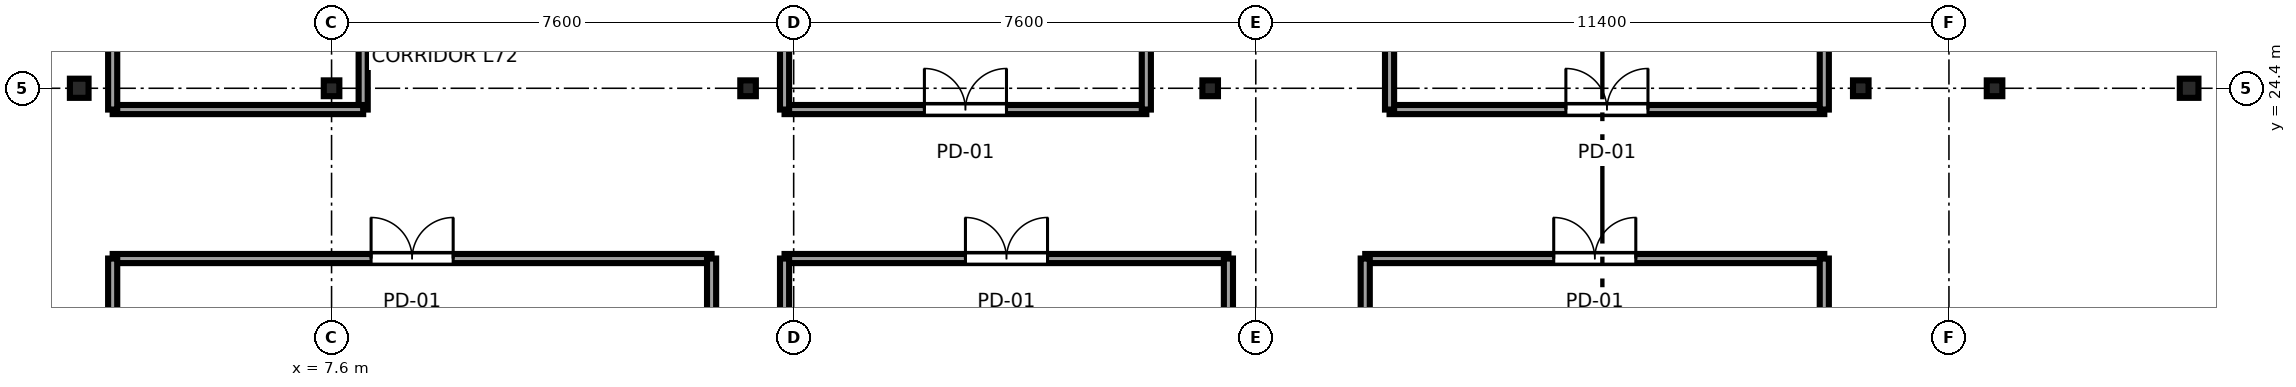
"""IFC4 building model, lengths in metres.
Left out: names, types, materials, properties, quantities, classifications, styles, units other than length and angle.
Written with IfcOpenShell. Run it as: python <this file> out.ifc"""

import sys

from ifc_helpers import new_model, si_unit, direction, frame, frame_2d, origin, origin_2d, place, context, subcontext, project, spatial, rectangle, i_section, extrude, source, transform, mapped, element, fill, save


model = new_model("IFC4")
c1 = context("Model", 3, precision=1e-05, world=origin(), true_north=direction((0.0, 1.0)))
c2 = subcontext(c1, "Body", "Model", "MODEL_VIEW")
j1 = project(units=[si_unit("LENGTHUNIT", "METRE"), si_unit("PLANEANGLEUNIT", "RADIAN")], contexts=[c1])
p1 = place(None, origin())
s1 = spatial("IfcSite", under=j1, at=p1, CompositionType="ELEMENT")
p2 = place(p1, origin())
s2 = spatial("IfcBuilding", under=s1, at=p2, CompositionType="ELEMENT")
p3 = place(p2, frame((0.0, 0.0, 270.05)))
s3 = spatial("IfcBuildingStorey", under=s2, at=p3, CompositionType="ELEMENT", Elevation=270.05)
m1 = source(origin(), c2, "Body", "SweptSolid", [
    extrude(i_section(OverallWidth=0.307, OverallDepth=0.315, WebThickness=0.012, FlangeThickness=0.019, FilletRadius=0.017, at=origin_2d()), origin(), (0.0, 0.0, 1.0), 5.0),
])
p4 = place(p3, frame((3.45, 24.4, 0.0), z_axis=(0.0, 0.0, 1.0), x_axis=(1.0, 0.0, 0.0)))
e1 = element("IfcColumn", 1, at=p4, inside=s3, PredefinedType="COLUMN", context=c2, shape_type="MappedRepresentation", body=[
    mapped(m1, transform((0.0, 0.0, 0.0), x_axis=(1.0, 0.0, 0.0), y_axis=(0.0, 1.0, 0.0), z_axis=(0.0, 0.0, 1.0), scale=1.0)),
])
m2 = source(origin(), c2, "Body", "SweptSolid", [
    extrude(i_section(OverallWidth=0.256, OverallDepth=0.26, WebThickness=0.01, FlangeThickness=0.017, FilletRadius=0.014, at=origin_2d()), origin(), (0.0, 0.0, 1.0), 5.0),
])
for number, where, z_axis, x_axis in (
    (2, (7.6, 24.4, 0.0), (0.0, 0.0, 1.0), (1.0, 0.0, 0.0)),
    (3, (14.45, 24.4, 0.0), (0.0, 0.0, 1.0), (1.0, 0.0, 0.0)),
    (4, (22.05, 24.4, 0.0), (0.0, 0.0, 1.0), (1.0, 0.0, 0.0)),
    (5, (32.75, 24.4, 0.0), (0.0, 0.0, 1.0), (1.0, 0.0, 0.0)),
    (6, (34.95, 24.4, 0.0), (0.0, 0.0, 1.0), (1.0, 0.0, 0.0)),
):
    element("IfcColumn", number, at=place(p3, frame(where, z_axis=z_axis, x_axis=x_axis)), inside=s3, PredefinedType="COLUMN", context=c2, shape_type="MappedRepresentation", body=[
        mapped(m2, transform((0.0, 0.0, 0.0), x_axis=(1.0, 0.0, 0.0), y_axis=(0.0, 1.0, 0.0), z_axis=(0.0, 0.0, 1.0), scale=1.0)),
    ])
p5 = place(p3, frame((38.15, 24.4, 0.0), z_axis=(0.0, 0.0, 1.0), x_axis=(1.0, 0.0, 0.0)))
e7 = element("IfcColumn", 7, at=p5, inside=s3, PredefinedType="COLUMN", context=c2, shape_type="MappedRepresentation", body=[
    mapped(m1, transform((0.0, 0.0, 0.0), x_axis=(1.0, 0.0, 0.0), y_axis=(0.0, 1.0, 0.0), z_axis=(0.0, 0.0, 1.0), scale=1.0)),
])
p6 = place(p3, frame((8.12, 24.05, 0.0), z_axis=(0.0, 0.0, 1.0), x_axis=(0.0, 1.0, 0.0)))
e8 = element("IfcWall", 8, at=p6, inside=s3, PredefinedType="PARTITIONING", context=c2, shape_type="SweptSolid", body=[
    extrude(rectangle(XDim=11.55, YDim=0.15, at=frame_2d((5.775, 0.0))), origin(), (0.0, 0.0, 1.0), 4.78),
])
p7 = place(p6, frame((4.125, 0.0, 0.0)))
e9 = element("IfcOpeningElement", 9, at=p7, cuts=e8, PredefinedType="OPENING", context=c2, shape_type="SweptSolid", body=[
    extrude(rectangle(XDim=1.35, YDim=2.15, at=frame_2d((0.675, 1.075))), frame((0.0, 0.085, 0.0), z_axis=(0.0, -1.0, 0.0), x_axis=(1.0, 0.0, 0.0)), (0.0, 0.0, 1.0), 0.17),
])
p8 = place(p3, frame((4.0, 24.05, 0.0), z_axis=(0.0, 0.0, 1.0), x_axis=(1.0, 0.0, 0.0)))
e10 = element("IfcWall", 10, at=p8, inside=s3, PredefinedType="PARTITIONING", context=c2, shape_type="SweptSolid", body=[
    extrude(rectangle(XDim=4.12, YDim=0.15, at=frame_2d((2.06, 0.0))), origin(), (0.0, 0.0, 1.0), 4.78),
])
p9 = place(p3, frame((4.0, 24.05, 0.0), z_axis=(0.0, 0.0, 1.0), x_axis=(0.0, 1.0, 0.0)))
e11 = element("IfcWall", 11, at=p9, inside=s3, PredefinedType="PARTITIONING", context=c2, shape_type="SweptSolid", body=[
    extrude(rectangle(XDim=11.55, YDim=0.15, at=frame_2d((5.775, 0.0))), origin(), (0.0, 0.0, 1.0), 4.31),
])
p10 = place(p3, frame((15.05, 24.05, 0.0), z_axis=(0.0, 0.0, 1.0), x_axis=(1.0, 0.0, 0.0)))
e12 = element("IfcWall", 12, at=p10, inside=s3, PredefinedType="PARTITIONING", context=c2, shape_type="SweptSolid", body=[
    extrude(rectangle(XDim=5.95, YDim=0.15, at=frame_2d((2.975, 0.0))), origin(), (0.0, 0.0, 1.0), 4.78),
])
p11 = place(p10, frame((2.3, 0.0, 0.0)))
e13 = element("IfcOpeningElement", 13, at=p11, cuts=e12, PredefinedType="OPENING", context=c2, shape_type="SweptSolid", body=[
    extrude(rectangle(XDim=1.35, YDim=2.15, at=frame_2d((0.675, 1.075))), frame((0.0, 0.085, 0.0), z_axis=(0.0, -1.0, 0.0), x_axis=(1.0, 0.0, 0.0)), (0.0, 0.0, 1.0), 0.17),
])
for number, where, z_axis, x_axis in (
    (14, (15.05, 24.05, 0.0), (0.0, 0.0, 1.0), (0.0, 1.0, 0.0)),
    (15, (21.0, 24.05, 0.0), (0.0, 0.0, 1.0), (0.0, 1.0, 0.0)),
):
    element("IfcWall", number, at=place(p3, frame(where, z_axis=z_axis, x_axis=x_axis)), inside=s3, PredefinedType="PARTITIONING", context=c2, shape_type="SweptSolid", body=[
        extrude(rectangle(XDim=5.4, YDim=0.15, at=frame_2d((2.7, 0.0))), origin(), (0.0, 0.0, 1.0), 4.78),
    ])
p12 = place(p3, frame((25.0, 24.05, 0.0), z_axis=(0.0, 0.0, 1.0), x_axis=(1.0, 0.0, 0.0)))
e16 = element("IfcWall", 16, at=p12, inside=s3, PredefinedType="PARTITIONING", context=c2, shape_type="SweptSolid", body=[
    extrude(rectangle(XDim=7.15, YDim=0.15, at=frame_2d((3.575, 0.0))), origin(), (0.0, 0.0, 1.0), 4.78),
])
p13 = place(p12, frame((2.9, 0.0, 0.0)))
e17 = element("IfcOpeningElement", 17, at=p13, cuts=e16, PredefinedType="OPENING", context=c2, shape_type="SweptSolid", body=[
    extrude(rectangle(XDim=1.35, YDim=2.15, at=frame_2d((0.675, 1.075))), frame((0.0, 0.085, 0.0), z_axis=(0.0, -1.0, 0.0), x_axis=(1.0, 0.0, 0.0)), (0.0, 0.0, 1.0), 0.17),
])
for number, where, z_axis, x_axis in (
    (18, (25.0, 24.05, 0.0), (0.0, 0.0, 1.0), (0.0, 1.0, 0.0)),
    (19, (32.15, 24.05, 0.0), (0.0, 0.0, 1.0), (0.0, 1.0, 0.0)),
):
    element("IfcWall", number, at=place(p3, frame(where, z_axis=z_axis, x_axis=x_axis)), inside=s3, PredefinedType="PARTITIONING", context=c2, shape_type="SweptSolid", body=[
        extrude(rectangle(XDim=5.4, YDim=0.15, at=frame_2d((2.7, 0.0))), origin(), (0.0, 0.0, 1.0), 4.78),
    ])
p14 = place(p3, frame((4.0, 21.6, 0.0), z_axis=(0.0, 0.0, 1.0), x_axis=(1.0, 0.0, 0.0)))
e20 = element("IfcWall", 20, at=p14, inside=s3, PredefinedType="PARTITIONING", context=c2, shape_type="SweptSolid", body=[
    extrude(rectangle(XDim=9.85, YDim=0.15, at=frame_2d((4.925, 0.0))), origin(), (0.0, 0.0, 1.0), 4.78),
])
p15 = place(p14, frame((4.25, 0.0, 0.0)))
e21 = element("IfcOpeningElement", 21, at=p15, cuts=e20, PredefinedType="OPENING", context=c2, shape_type="SweptSolid", body=[
    extrude(rectangle(XDim=1.35, YDim=2.15, at=frame_2d((0.675, 1.075))), frame((0.0, 0.085, 0.0), z_axis=(0.0, -1.0, 0.0), x_axis=(1.0, 0.0, 0.0)), (0.0, 0.0, 1.0), 0.17),
])
p16 = place(p3, frame((4.0, 7.984, 0.0), z_axis=(0.0, 0.0, 1.0), x_axis=(0.0, 1.0, 0.0)))
e22 = element("IfcWall", 22, at=p16, inside=s3, PredefinedType="PARTITIONING", context=c2, shape_type="SweptSolid", body=[
    extrude(rectangle(XDim=13.616, YDim=0.15, at=frame_2d((6.808, 0.0))), origin(), (0.0, 0.0, 1.0), 3.57),
])
p17 = place(p3, frame((13.85, 6.65, 0.0), z_axis=(0.0, 0.0, 1.0), x_axis=(0.0, 1.0, 0.0)))
e23 = element("IfcWall", 23, at=p17, inside=s3, PredefinedType="PARTITIONING", context=c2, shape_type="SweptSolid", body=[
    extrude(rectangle(XDim=14.95, YDim=0.15, at=frame_2d((7.475, 0.0))), origin(), (0.0, 0.0, 1.0), 4.78),
])
p18 = place(p3, frame((15.05, 21.6, 0.0), z_axis=(0.0, 0.0, 1.0), x_axis=(1.0, 0.0, 0.0)))
e24 = element("IfcWall", 24, at=p18, inside=s3, PredefinedType="PARTITIONING", context=c2, shape_type="SweptSolid", body=[
    extrude(rectangle(XDim=7.3, YDim=0.15, at=frame_2d((3.65, 0.0))), origin(), (0.0, 0.0, 1.0), 4.78),
])
p19 = place(p18, frame((2.975, 0.0, 0.0)))
e25 = element("IfcOpeningElement", 25, at=p19, cuts=e24, PredefinedType="OPENING", context=c2, shape_type="SweptSolid", body=[
    extrude(rectangle(XDim=1.35, YDim=2.15, at=frame_2d((0.675, 1.075))), frame((0.0, 0.085, 0.0), z_axis=(0.0, -1.0, 0.0), x_axis=(1.0, 0.0, 0.0)), (0.0, 0.0, 1.0), 0.17),
])
p20 = place(p3, frame((15.05, 16.6, 0.0), z_axis=(0.0, 0.0, 1.0), x_axis=(0.0, 1.0, 0.0)))
e26 = element("IfcWall", 26, at=p20, inside=s3, PredefinedType="PARTITIONING", context=c2, shape_type="SweptSolid", body=[
    extrude(rectangle(XDim=5.0, YDim=0.15, at=frame_2d((2.5, 0.0))), origin(), (0.0, 0.0, 1.0), 4.78),
])
p21 = place(p3, frame((22.35, 16.6, 0.0), z_axis=(0.0, 0.0, 1.0), x_axis=(0.0, 1.0, 0.0)))
e27 = element("IfcWall", 27, at=p21, inside=s3, PredefinedType="PARTITIONING", context=c2, shape_type="SweptSolid", body=[
    extrude(rectangle(XDim=5.0, YDim=0.15, at=frame_2d((2.5, 0.0))), origin(), (0.0, 0.0, 1.0), 3.57),
])
p22 = place(p3, frame((24.6, 21.6, 0.0), z_axis=(0.0, 0.0, 1.0), x_axis=(1.0, 0.0, 0.0)))
e28 = element("IfcWall", 28, at=p22, inside=s3, PredefinedType="PARTITIONING", context=c2, shape_type="SweptSolid", body=[
    extrude(rectangle(XDim=7.55, YDim=0.15, at=frame_2d((3.775, 0.0))), origin(), (0.0, 0.0, 1.0), 4.78),
])
p23 = place(p22, frame((3.1, 0.0, 0.0)))
e29 = element("IfcOpeningElement", 29, at=p23, cuts=e28, PredefinedType="OPENING", context=c2, shape_type="SweptSolid", body=[
    extrude(rectangle(XDim=1.35, YDim=2.15, at=frame_2d((0.675, 1.075))), frame((0.0, 0.085, 0.0), z_axis=(0.0, -1.0, 0.0), x_axis=(1.0, 0.0, 0.0)), (0.0, 0.0, 1.0), 0.17),
])
for number, where, z_axis, x_axis in (
    (30, (24.6, 16.6, 0.0), (0.0, 0.0, 1.0), (0.0, 1.0, 0.0)),
    (31, (32.15, 16.6, 0.0), (0.0, 0.0, 1.0), (0.0, 1.0, 0.0)),
):
    element("IfcWall", number, at=place(p3, frame(where, z_axis=z_axis, x_axis=x_axis)), inside=s3, PredefinedType="PARTITIONING", context=c2, shape_type="SweptSolid", body=[
        extrude(rectangle(XDim=5.0, YDim=0.15, at=frame_2d((2.5, 0.0))), origin(), (0.0, 0.0, 1.0), 4.78),
    ])
m3 = source(origin(), c2, "Body", "SweptSolid", [
    extrude(rectangle(XDim=1.35, YDim=2.15, at=frame_2d((0.675, 1.075))), frame((0.0, 0.025, 0.0), z_axis=(0.0, -1.0, 0.0), x_axis=(1.0, 0.0, 0.0)), (0.0, 0.0, 1.0), 0.05),
])
p24 = place(p11, origin())
e32 = element("IfcDoor", 32, at=p24, inside=s3, OperationType="DOUBLE_DOOR_SINGLE_SWING", PredefinedType="DOOR", context=c2, shape_type="MappedRepresentation", body=[
    mapped(m3, transform((0.0, 0.0, 0.0), x_axis=(1.0, 0.0, 0.0), y_axis=(0.0, 1.0, 0.0), z_axis=(0.0, 0.0, 1.0), scale=1.0)),
])
fill(e13, e32)
p25 = place(p13, origin())
e33 = element("IfcDoor", 33, at=p25, inside=s3, OperationType="DOUBLE_DOOR_SINGLE_SWING", PredefinedType="DOOR", context=c2, shape_type="MappedRepresentation", body=[
    mapped(m3, transform((0.0, 0.0, 0.0), x_axis=(1.0, 0.0, 0.0), y_axis=(0.0, 1.0, 0.0), z_axis=(0.0, 0.0, 1.0), scale=1.0)),
])
fill(e17, e33)
p26 = place(p15, origin())
e34 = element("IfcDoor", 34, at=p26, inside=s3, OperationType="DOUBLE_DOOR_SINGLE_SWING", PredefinedType="DOOR", context=c2, shape_type="MappedRepresentation", body=[
    mapped(m3, transform((0.0, 0.0, 0.0), x_axis=(1.0, 0.0, 0.0), y_axis=(0.0, 1.0, 0.0), z_axis=(0.0, 0.0, 1.0), scale=1.0)),
])
fill(e21, e34)
p27 = place(p19, origin())
e35 = element("IfcDoor", 35, at=p27, inside=s3, OperationType="DOUBLE_DOOR_SINGLE_SWING", PredefinedType="DOOR", context=c2, shape_type="MappedRepresentation", body=[
    mapped(m3, transform((0.0, 0.0, 0.0), x_axis=(1.0, 0.0, 0.0), y_axis=(0.0, 1.0, 0.0), z_axis=(0.0, 0.0, 1.0), scale=1.0)),
])
fill(e25, e35)
p28 = place(p23, origin())
e36 = element("IfcDoor", 36, at=p28, inside=s3, OperationType="DOUBLE_DOOR_SINGLE_SWING", PredefinedType="DOOR", context=c2, shape_type="MappedRepresentation", body=[
    mapped(m3, transform((0.0, 0.0, 0.0), x_axis=(1.0, 0.0, 0.0), y_axis=(0.0, 1.0, 0.0), z_axis=(0.0, 0.0, 1.0), scale=1.0)),
])
fill(e29, e36)
save(model, sys.argv[1])
